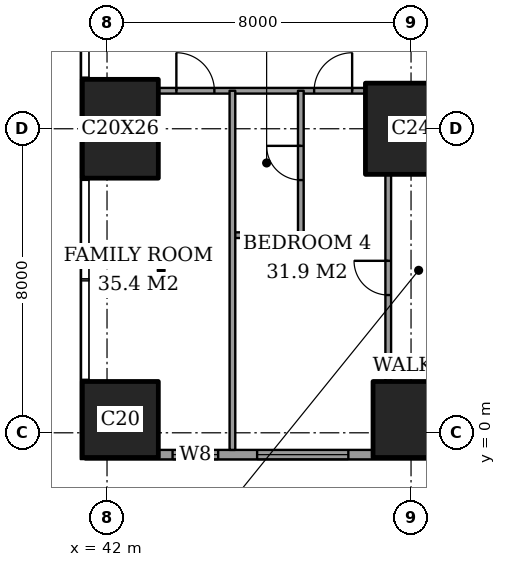
"""IFC4 building model, lengths in metres.
Left out: names, types, materials, properties, quantities, classifications, styles, units other than length and angle.
Written with IfcOpenShell. Run it as: python <this file> out.ifc"""

import sys

from ifc_helpers import new_model, si_unit, direction, frame, frame_2d, origin, origin_2d, place, context, subcontext, project, spatial, rectangle, extrude, element, fill, save


model = new_model("IFC4")
c1 = context("Model", 3, precision=1e-05, world=origin(), true_north=direction((0.0, 1.0)))
c2 = subcontext(c1, "Body", "Model", "MODEL_VIEW")
j1 = project(units=[si_unit("LENGTHUNIT", "METRE"), si_unit("PLANEANGLEUNIT", "RADIAN")], contexts=[c1])
p1 = place(None, origin())
s1 = spatial("IfcSite", under=j1, at=p1, CompositionType="ELEMENT")
p2 = place(p1, origin())
s2 = spatial("IfcBuilding", under=s1, at=p2, CompositionType="ELEMENT")
p3 = place(p2, frame((0.0, 0.0, 54.8)))
s3 = spatial("IfcBuildingStorey", under=s2, at=p3, CompositionType="ELEMENT", Elevation=54.8)
p4 = place(p3, frame((42.35, 0.35, 0.0), z_axis=(0.0, 0.0, 1.0), x_axis=(1.0, 0.0, 0.0)))
e1 = element("IfcColumn", 1, at=p4, inside=s3, PredefinedType="COLUMN", context=c2, shape_type="SweptSolid", body=[
    extrude(rectangle(XDim=2.0, YDim=2.0, at=origin_2d()), origin(), (0.0, 0.0, 1.0), 3.6),
])
p5 = place(p3, frame((42.35, 8.0, 0.0), z_axis=(0.0, 0.0, 1.0), x_axis=(1.0, 0.0, 0.0)))
e2 = element("IfcColumn", 2, at=p5, inside=s3, PredefinedType="COLUMN", context=c2, shape_type="SweptSolid", body=[
    extrude(rectangle(XDim=2.0, YDim=2.6, at=origin_2d()), origin(), (0.0, 0.0, 1.0), 3.6),
])
p6 = place(p3, frame((50.0, 0.35, 0.0), z_axis=(0.0, 0.0, 1.0), x_axis=(1.0, 0.0, 0.0)))
e3 = element("IfcColumn", 3, at=p6, inside=s3, PredefinedType="COLUMN", context=c2, shape_type="SweptSolid", body=[
    extrude(rectangle(XDim=2.0, YDim=2.0, at=origin_2d()), origin(), (0.0, 0.0, 1.0), 3.6),
])
p7 = place(p3, frame((50.0, 8.0, 0.0), z_axis=(0.0, 0.0, 1.0), x_axis=(1.0, 0.0, 0.0)))
e4 = element("IfcColumn", 4, at=p7, inside=s3, PredefinedType="COLUMN", context=c2, shape_type="SweptSolid", body=[
    extrude(rectangle(XDim=2.4, YDim=2.4, at=origin_2d()), origin(), (0.0, 0.0, 1.0), 3.6),
])
p8 = place(p3, frame((41.425, -0.575, 0.0), z_axis=(0.0, 0.0, 1.0), x_axis=(1.0, 0.0, 0.0)))
e5 = element("IfcWall", 5, at=p8, inside=s3, PredefinedType="SOLIDWALL", context=c2, shape_type="SweptSolid", body=[
    extrude(rectangle(XDim=21.4, YDim=0.25, at=frame_2d((10.7, 0.0))), origin(), (0.0, 0.0, 1.0), 3.6),
])
p9 = place(p8, frame((2.3, 0.0, 0.6)))
e6 = element("IfcOpeningElement", 6, at=p9, cuts=e5, PredefinedType="OPENING", context=c2, shape_type="SweptSolid", body=[
    extrude(rectangle(XDim=1.2, YDim=2.0, at=frame_2d((0.6, 1.0))), frame((0.0, 0.135, 0.0), z_axis=(0.0, -1.0, 0.0), x_axis=(1.0, 0.0, 0.0)), (0.0, 0.0, 1.0), 0.27),
])
p10 = place(p8, frame((4.525, 0.0, 0.6)))
e7 = element("IfcOpeningElement", 7, at=p10, cuts=e5, PredefinedType="OPENING", context=c2, shape_type="SweptSolid", body=[
    extrude(rectangle(XDim=2.4, YDim=2.0, at=frame_2d((1.2, 1.0))), frame((0.0, 0.135, 0.0), z_axis=(0.0, -1.0, 0.0), x_axis=(1.0, 0.0, 0.0)), (0.0, 0.0, 1.0), 0.27),
])
p11 = place(p8, frame((9.9, 0.0, 0.6)))
e8 = element("IfcOpeningElement", 8, at=p11, cuts=e5, PredefinedType="OPENING", context=c2, shape_type="SweptSolid", body=[
    extrude(rectangle(XDim=1.2, YDim=2.0, at=frame_2d((0.6, 1.0))), frame((0.0, 0.135, 0.0), z_axis=(0.0, -1.0, 0.0), x_axis=(1.0, 0.0, 0.0)), (0.0, 0.0, 1.0), 0.27),
])
p12 = place(p8, frame((12.225, 0.0, 0.6)))
e9 = element("IfcOpeningElement", 9, at=p12, cuts=e5, PredefinedType="OPENING", context=c2, shape_type="SweptSolid", body=[
    extrude(rectangle(XDim=2.4, YDim=2.0, at=frame_2d((1.2, 1.0))), frame((0.0, 0.135, 0.0), z_axis=(0.0, -1.0, 0.0), x_axis=(1.0, 0.0, 0.0)), (0.0, 0.0, 1.0), 0.27),
])
p13 = place(p8, frame((19.2, 0.0, 0.6)))
e10 = element("IfcOpeningElement", 10, at=p13, cuts=e5, PredefinedType="OPENING", context=c2, shape_type="SweptSolid", body=[
    extrude(rectangle(XDim=1.2, YDim=2.0, at=frame_2d((0.6, 1.0))), frame((0.0, 0.135, 0.0), z_axis=(0.0, -1.0, 0.0), x_axis=(1.0, 0.0, 0.0)), (0.0, 0.0, 1.0), 0.27),
])
p14 = place(p3, frame((45.3, 5.2, 0.0), z_axis=(0.0, 0.0, 1.0), x_axis=(1.0, 0.0, 0.0)))
e11 = element("IfcWall", 11, at=p14, inside=s3, PredefinedType="PARTITIONING", context=c2, shape_type="SweptSolid", body=[
    extrude(rectangle(XDim=1.8, YDim=0.15, at=frame_2d((0.9, 0.0))), origin(), (0.0, 0.0, 1.0), 3.35),
])
p15 = place(p3, frame((43.35, 9.0, 0.0), z_axis=(0.0, 0.0, 1.0), x_axis=(1.0, 0.0, 0.0)))
e12 = element("IfcWall", 12, at=p15, inside=s3, PredefinedType="PARTITIONING", context=c2, shape_type="SweptSolid", body=[
    extrude(rectangle(XDim=5.45, YDim=0.15, at=frame_2d((2.725, 0.0))), origin(), (0.0, 0.0, 1.0), 3.35),
])
p16 = place(p15, frame((4.1, 0.0, 0.0)))
e13 = element("IfcOpeningElement", 13, at=p16, cuts=e12, PredefinedType="OPENING", context=c2, shape_type="SweptSolid", body=[
    extrude(rectangle(XDim=1.0, YDim=2.1, at=frame_2d((0.5, 1.05))), frame((0.0, 0.085, 0.0), z_axis=(0.0, -1.0, 0.0), x_axis=(1.0, 0.0, 0.0)), (0.0, 0.0, 1.0), 0.17),
])
p17 = place(p15, frame((0.475, 0.0, 0.0)))
e14 = element("IfcOpeningElement", 14, at=p17, cuts=e12, PredefinedType="OPENING", context=c2, shape_type="SweptSolid", body=[
    extrude(rectangle(XDim=1.0, YDim=2.1, at=frame_2d((0.5, 1.05))), frame((0.0, 0.085, 0.0), z_axis=(0.0, -1.0, 0.0), x_axis=(1.0, 0.0, 0.0)), (0.0, 0.0, 1.0), 0.17),
])
p18 = place(p3, frame((45.3, -0.45, 0.0), z_axis=(0.0, 0.0, 1.0), x_axis=(0.0, 1.0, 0.0)))
e15 = element("IfcWall", 15, at=p18, inside=s3, PredefinedType="PARTITIONING", context=c2, shape_type="SweptSolid", body=[
    extrude(rectangle(XDim=9.45, YDim=0.15, at=frame_2d((4.725, 0.0))), origin(), (0.0, 0.0, 1.0), 3.35),
])
p19 = place(p3, frame((47.1, 5.2, 0.0), z_axis=(0.0, 0.0, 1.0), x_axis=(0.0, 1.0, 0.0)))
e16 = element("IfcWall", 16, at=p19, inside=s3, PredefinedType="PARTITIONING", context=c2, shape_type="SweptSolid", body=[
    extrude(rectangle(XDim=3.8, YDim=0.15, at=frame_2d((1.9, 0.0))), origin(), (0.0, 0.0, 1.0), 3.35),
])
p20 = place(p19, frame((1.45, 0.0, 0.0)))
e17 = element("IfcOpeningElement", 17, at=p20, cuts=e16, PredefinedType="OPENING", context=c2, shape_type="SweptSolid", body=[
    extrude(rectangle(XDim=0.9, YDim=2.1, at=frame_2d((0.45, 1.05))), frame((0.0, 0.085, 0.0), z_axis=(0.0, -1.0, 0.0), x_axis=(1.0, 0.0, 0.0)), (0.0, 0.0, 1.0), 0.17),
])
p21 = place(p3, frame((49.4, 1.35, 0.0), z_axis=(0.0, 0.0, 1.0), x_axis=(0.0, 1.0, 0.0)))
e18 = element("IfcWall", 18, at=p21, inside=s3, PredefinedType="PARTITIONING", context=c2, shape_type="SweptSolid", body=[
    extrude(rectangle(XDim=5.45, YDim=0.15, at=frame_2d((2.725, 0.0))), origin(), (0.0, 0.0, 1.0), 3.35),
])
p22 = place(p21, frame((2.275, 0.0, 0.0)))
e19 = element("IfcOpeningElement", 19, at=p22, cuts=e18, PredefinedType="OPENING", context=c2, shape_type="SweptSolid", body=[
    extrude(rectangle(XDim=0.9, YDim=2.1, at=frame_2d((0.45, 1.05))), frame((0.0, 0.085, 0.0), z_axis=(0.0, -1.0, 0.0), x_axis=(1.0, 0.0, 0.0)), (0.0, 0.0, 1.0), 0.17),
])
p23 = place(p9, origin())
e20 = element("IfcWindow", 20, at=p23, inside=s3, PartitioningType="SINGLE_PANEL", PredefinedType="WINDOW", context=c2, shape_type="SweptSolid", body=[
    extrude(rectangle(XDim=1.2, YDim=2.0, at=frame_2d((0.6, 1.0))), frame((0.0, 0.03, 0.0), z_axis=(0.0, -1.0, 0.0), x_axis=(1.0, 0.0, 0.0)), (0.0, 0.0, 1.0), 0.06),
])
fill(e6, e20)
p24 = place(p10, origin())
e21 = element("IfcWindow", 21, at=p24, inside=s3, PartitioningType="SINGLE_PANEL", PredefinedType="WINDOW", context=c2, shape_type="SweptSolid", body=[
    extrude(rectangle(XDim=2.4, YDim=2.0, at=frame_2d((1.2, 1.0))), frame((0.0, 0.03, 0.0), z_axis=(0.0, -1.0, 0.0), x_axis=(1.0, 0.0, 0.0)), (0.0, 0.0, 1.0), 0.06),
])
fill(e7, e21)
p25 = place(p22, origin())
e22 = element("IfcDoor", 22, at=p25, inside=s3, OperationType="SINGLE_SWING_LEFT", PredefinedType="DOOR", context=c2, shape_type="SweptSolid", body=[
    extrude(rectangle(XDim=0.9, YDim=2.1, at=frame_2d((0.45, 1.05))), frame((0.0, 0.025, 0.0), z_axis=(0.0, -1.0, 0.0), x_axis=(1.0, 0.0, 0.0)), (0.0, 0.0, 1.0), 0.05),
])
fill(e19, e22)
p26 = place(p20, origin())
e23 = element("IfcDoor", 23, at=p26, inside=s3, OperationType="SINGLE_SWING_LEFT", PredefinedType="DOOR", context=c2, shape_type="SweptSolid", body=[
    extrude(rectangle(XDim=0.9, YDim=2.1, at=frame_2d((0.45, 1.05))), frame((0.0, 0.025, 0.0), z_axis=(0.0, -1.0, 0.0), x_axis=(1.0, 0.0, 0.0)), (0.0, 0.0, 1.0), 0.05),
])
fill(e17, e23)
p27 = place(p16, origin())
e24 = element("IfcDoor", 24, at=p27, inside=s3, OperationType="SINGLE_SWING_LEFT", PredefinedType="DOOR", context=c2, shape_type="SweptSolid", body=[
    extrude(rectangle(XDim=1.0, YDim=2.1, at=frame_2d((0.5, 1.05))), frame((0.0, 0.025, 0.0), z_axis=(0.0, -1.0, 0.0), x_axis=(1.0, 0.0, 0.0)), (0.0, 0.0, 1.0), 0.05),
])
fill(e13, e24)
p28 = place(p17, origin())
e25 = element("IfcDoor", 25, at=p28, inside=s3, OperationType="SINGLE_SWING_RIGHT", PredefinedType="DOOR", context=c2, shape_type="SweptSolid", body=[
    extrude(rectangle(XDim=1.0, YDim=2.1, at=frame_2d((0.5, 1.05))), frame((0.0, 0.025, 0.0), z_axis=(0.0, -1.0, 0.0), x_axis=(1.0, 0.0, 0.0)), (0.0, 0.0, 1.0), 0.05),
])
fill(e14, e25)
save(model, sys.argv[1])
